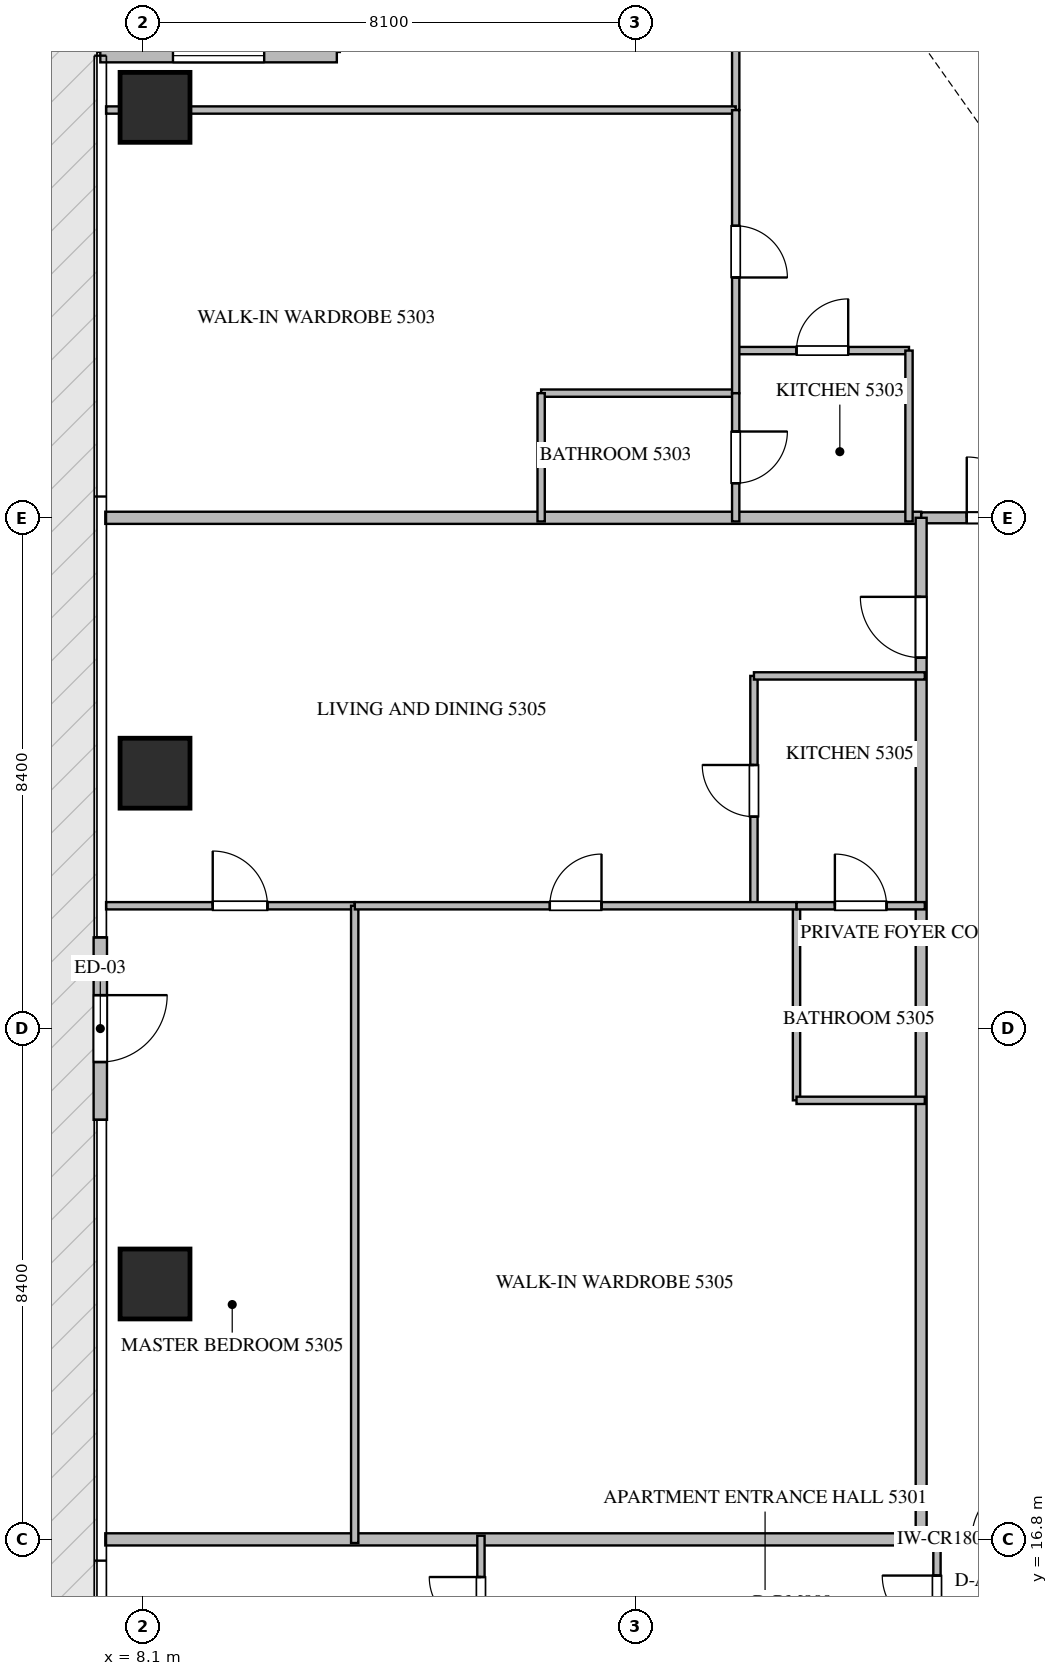
"""IFC4 building model, lengths in metres.
Left out: names, types, materials, properties, quantities, classifications, styles, units other than length and angle.
Written with IfcOpenShell. Run it as: python <this file> out.ifc"""

import sys

from ifc_helpers import new_model, si_unit, direction, frame, frame_2d, origin, origin_2d, place, context, subcontext, project, spatial, rectangle, extrude, source, transform, mapped, element, fill, save


model = new_model("IFC4")
c1 = context("Model", 3, precision=1e-05, world=origin(), true_north=direction((0.0, 1.0)))
c2 = subcontext(c1, "Body", "Model", "MODEL_VIEW")
j1 = project(units=[si_unit("LENGTHUNIT", "METRE"), si_unit("PLANEANGLEUNIT", "RADIAN")], contexts=[c1])
p1 = place(None, origin())
s1 = spatial("IfcSite", under=j1, at=p1, CompositionType="ELEMENT")
p2 = place(p1, origin())
s2 = spatial("IfcBuilding", under=s1, at=p2, CompositionType="ELEMENT")
p3 = place(p2, frame((0.0, 0.0, 214.3)))
s3 = spatial("IfcBuildingStorey", under=s2, at=p3, CompositionType="ELEMENT", Elevation=214.3)
m1 = source(origin(), c2, "Body", "SweptSolid", [
    extrude(rectangle(XDim=1.15, YDim=1.15, at=origin_2d()), origin(), (0.0, 0.0, 1.0), 3.85),
])
for number, where, z_axis, x_axis in (
    (1, (8.3, 21.0, -0.26), (0.0, 0.0, 1.0), (1.0, 0.0, 0.0)),
    (2, (8.3, 29.4, -0.26), (0.0, 0.0, 1.0), (1.0, 0.0, 0.0)),
    (3, (8.3, 40.35, -0.26), (0.0, 0.0, 1.0), (1.0, 0.0, 0.0)),
):
    element("IfcColumn", number, at=place(p3, frame(where, z_axis=z_axis, x_axis=x_axis)), inside=s3, PredefinedType="COLUMN", context=c2, shape_type="MappedRepresentation", body=[
        mapped(m1, transform((0.0, 0.0, 0.0), scale=1.0)),
    ])
p4 = place(p3, frame((11.29, 41.2, 0.0), z_axis=(0.0, 0.0, 1.0), x_axis=(-1.0, 0.0, 0.0)))
e4 = element("IfcWall", 4, at=p4, inside=s3, PredefinedType="ELEMENTEDWALL", context=c2, shape_type="SweptSolid", body=[
    extrude(rectangle(XDim=3.89, YDim=0.22, at=frame_2d((1.945, 0.0))), origin(), (0.0, 0.0, 1.0), 3.575),
])
p5 = place(p4, frame((1.195, 0.0, 0.65)))
e5 = element("IfcOpeningElement", 5, at=p5, cuts=e4, PredefinedType="OPENING", context=c2, shape_type="SweptSolid", body=[
    extrude(rectangle(XDim=1.5, YDim=2.25, at=frame_2d((0.75, 1.125))), frame((0.0, 0.12, 0.0), z_axis=(0.0, -1.0, 0.0), x_axis=(1.0, 0.0, 0.0)), (0.0, 0.0, 1.0), 0.24),
])
p6 = place(p3, frame((7.4, 26.7, 0.0), z_axis=(0.0, 0.0, 1.0), x_axis=(0.0, -1.0, 0.0)))
e6 = element("IfcWall", 6, at=p6, inside=s3, PredefinedType="ELEMENTEDWALL", context=c2, shape_type="SweptSolid", body=[
    extrude(rectangle(XDim=3.0, YDim=0.22, at=frame_2d((1.5, 0.0))), origin(), (0.0, 0.0, 1.0), 3.575),
])
p7 = place(p6, frame((0.95, 0.0, 0.0)))
e7 = element("IfcOpeningElement", 7, at=p7, cuts=e6, PredefinedType="OPENING", context=c2, shape_type="SweptSolid", body=[
    extrude(rectangle(XDim=1.1, YDim=2.2, at=frame_2d((0.55, 1.1))), frame((0.0, 0.12, 0.0), z_axis=(0.0, -1.0, 0.0), x_axis=(1.0, 0.0, 0.0)), (0.0, 0.0, 1.0), 0.24),
])
for number, where, z_axis, x_axis in (
    (8, (7.482, 16.8, 0.0), (0.0, 0.0, 1.0), (1.0, 0.0, 0.0)),
    (9, (7.482, 33.6, 0.0), (0.0, 0.0, 1.0), (1.0, 0.0, 0.0)),
):
    element("IfcWall", number, at=place(p3, frame(where, z_axis=z_axis, x_axis=x_axis)), inside=s3, PredefinedType="PARTITIONING", context=c2, shape_type="SweptSolid", body=[
        extrude(rectangle(XDim=13.418, YDim=0.2, at=frame_2d((6.709, 0.0))), origin(), (0.0, 0.0, 1.0), 3.59),
    ])
p8 = place(p3, frame((20.902, 16.8, 0.0), z_axis=(0.0, 0.0, 1.0), x_axis=(1.0, 0.0, 0.0)))
e10 = element("IfcWall", 10, at=p8, inside=s3, PredefinedType="PARTITIONING", context=c2, shape_type="SweptSolid", body=[
    extrude(rectangle(XDim=2.496, YDim=0.18, at=frame_2d((1.248, 0.0))), origin(), (0.0, 0.0, 1.0), 3.59),
])
p9 = place(p8, frame((0.83, 0.0, 0.0)))
e11 = element("IfcOpeningElement", 11, at=p9, cuts=e10, PredefinedType="OPENING", context=c2, shape_type="SweptSolid", body=[
    extrude(rectangle(XDim=1.0, YDim=2.15, at=frame_2d((0.5, 1.075))), frame((0.0, 0.1, 0.0), z_axis=(0.0, -1.0, 0.0), x_axis=(1.0, 0.0, 0.0)), (0.0, 0.0, 1.0), 0.2),
])
p10 = place(p3, frame((20.902, 33.6, 0.0), z_axis=(0.0, 0.0, 1.0), x_axis=(1.0, 0.0, 0.0)))
e12 = element("IfcWall", 12, at=p10, inside=s3, PredefinedType="PARTITIONING", context=c2, shape_type="SweptSolid", body=[
    extrude(rectangle(XDim=2.496, YDim=0.18, at=frame_2d((1.248, 0.0))), origin(), (0.0, 0.0, 1.0), 3.59),
])
p11 = place(p10, frame((0.748, 0.0, 0.0)))
e13 = element("IfcOpeningElement", 13, at=p11, cuts=e12, PredefinedType="OPENING", context=c2, shape_type="SweptSolid", body=[
    extrude(rectangle(XDim=1.0, YDim=2.15, at=frame_2d((0.5, 1.075))), frame((0.0, 0.1, 0.0), z_axis=(0.0, -1.0, 0.0), x_axis=(1.0, 0.0, 0.0)), (0.0, 0.0, 1.0), 0.2),
])
p12 = place(p3, frame((20.9, 16.8, 0.0), z_axis=(0.0, 0.0, 1.0), x_axis=(0.0, 1.0, 0.0)))
e14 = element("IfcWall", 14, at=p12, inside=s3, PredefinedType="PARTITIONING", context=c2, shape_type="SweptSolid", body=[
    extrude(rectangle(XDim=16.8, YDim=0.18, at=frame_2d((8.4, 0.0))), origin(), (0.0, 0.0, 1.0), 3.59),
])
p13 = place(p12, frame((14.5, 0.0, 0.0)))
e15 = element("IfcOpeningElement", 15, at=p13, cuts=e14, PredefinedType="OPENING", context=c2, shape_type="SweptSolid", body=[
    extrude(rectangle(XDim=1.0, YDim=2.15, at=frame_2d((0.5, 1.075))), frame((0.0, 0.1, 0.0), z_axis=(0.0, -1.0, 0.0), x_axis=(1.0, 0.0, 0.0)), (0.0, 0.0, 1.0), 0.2),
])
p14 = place(p3, frame((21.16, 14.65, 0.0), z_axis=(0.0, 0.0, 1.0), x_axis=(0.0, 1.0, 0.0)))
e16 = element("IfcWall", 16, at=p14, inside=s3, PredefinedType="PARTITIONING", context=c2, shape_type="SweptSolid", body=[
    extrude(rectangle(XDim=2.21, YDim=0.12, at=frame_2d((1.105, 0.0))), origin(), (0.0, 0.0, 1.0), 3.59),
])
p15 = place(p14, frame((0.655, 0.0, 0.0)))
e17 = element("IfcOpeningElement", 17, at=p15, cuts=e16, PredefinedType="OPENING", context=c2, shape_type="SweptSolid", body=[
    extrude(rectangle(XDim=0.9, YDim=2.1, at=frame_2d((0.45, 1.05))), frame((0.0, 0.07, 0.0), z_axis=(0.0, -1.0, 0.0), x_axis=(1.0, 0.0, 0.0)), (0.0, 0.0, 1.0), 0.14),
])
p16 = place(p3, frame((13.66, 14.652, 0.0), z_axis=(0.0, 0.0, 1.0), x_axis=(0.0, 1.0, 0.0)))
e18 = element("IfcWall", 18, at=p16, inside=s3, PredefinedType="PARTITIONING", context=c2, shape_type="SweptSolid", body=[
    extrude(rectangle(XDim=2.208, YDim=0.12, at=frame_2d((1.104, 0.0))), origin(), (0.0, 0.0, 1.0), 3.59),
])
p17 = place(p16, frame((0.679, 0.0, 0.0)))
e19 = element("IfcOpeningElement", 19, at=p17, cuts=e18, PredefinedType="OPENING", context=c2, shape_type="SweptSolid", body=[
    extrude(rectangle(XDim=0.85, YDim=2.1, at=frame_2d((0.425, 1.05))), frame((0.0, 0.07, 0.0), z_axis=(0.0, -1.0, 0.0), x_axis=(1.0, 0.0, 0.0)), (0.0, 0.0, 1.0), 0.14),
])
p18 = place(p3, frame((17.85, 36.35, 0.0), z_axis=(0.0, 0.0, 1.0), x_axis=(1.0, 0.0, 0.0)))
e20 = element("IfcWall", 20, at=p18, inside=s3, PredefinedType="PARTITIONING", context=c2, shape_type="SweptSolid", body=[
    extrude(rectangle(XDim=2.85, YDim=0.12, at=frame_2d((1.425, 0.0))), origin(), (0.0, 0.0, 1.0), 3.59),
])
p19 = place(p18, frame((1.0, 0.0, 0.0)))
e21 = element("IfcOpeningElement", 21, at=p19, cuts=e20, PredefinedType="OPENING", context=c2, shape_type="SweptSolid", body=[
    extrude(rectangle(XDim=0.85, YDim=2.1, at=frame_2d((0.425, 1.05))), frame((0.0, 0.07, 0.0), z_axis=(0.0, -1.0, 0.0), x_axis=(1.0, 0.0, 0.0)), (0.0, 0.0, 1.0), 0.14),
])
p20 = place(p3, frame((20.7, 36.35, 0.0), z_axis=(0.0, 0.0, 1.0), x_axis=(0.0, -1.0, 0.0)))
e22 = element("IfcWall", 22, at=p20, inside=s3, PredefinedType="PARTITIONING", context=c2, shape_type="SweptSolid", body=[
    extrude(rectangle(XDim=2.81, YDim=0.12, at=frame_2d((1.405, 0.0))), origin(), (0.0, 0.0, 1.0), 3.59),
])
p21 = place(p3, frame((17.85, 49.105, 0.0), z_axis=(0.0, 0.0, 1.0), x_axis=(0.0, -1.0, 0.0)))
e23 = element("IfcWall", 23, at=p21, inside=s3, PredefinedType="PARTITIONING", context=c2, shape_type="SweptSolid", body=[
    extrude(rectangle(XDim=8.799, YDim=0.12, at=frame_2d((4.399, 0.0))), origin(), (0.0, 0.0, 1.0), 3.59),
])
p22 = place(p21, frame((4.344, 0.0, 0.0)))
e24 = element("IfcOpeningElement", 24, at=p22, cuts=e23, PredefinedType="OPENING", context=c2, shape_type="SweptSolid", body=[
    extrude(rectangle(XDim=0.9, YDim=2.1, at=frame_2d((0.45, 1.05))), frame((0.0, 0.07, 0.0), z_axis=(0.0, -1.0, 0.0), x_axis=(1.0, 0.0, 0.0)), (0.0, 0.0, 1.0), 0.14),
])
p23 = place(p3, frame((7.495, 40.306, 0.0), z_axis=(0.0, 0.0, 1.0), x_axis=(1.0, 0.0, 0.0)))
e25 = element("IfcWall", 25, at=p23, inside=s3, PredefinedType="PARTITIONING", context=c2, shape_type="SweptSolid", body=[
    extrude(rectangle(XDim=10.355, YDim=0.12, at=frame_2d((5.177, 0.0))), origin(), (0.0, 0.0, 1.0), 3.122),
])
p24 = place(p3, frame((14.65, 35.65, 0.0), z_axis=(0.0, 0.0, 1.0), x_axis=(1.0, 0.0, 0.0)))
e26 = element("IfcWall", 26, at=p24, inside=s3, PredefinedType="PARTITIONING", context=c2, shape_type="SweptSolid", body=[
    extrude(rectangle(XDim=3.2, YDim=0.12, at=frame_2d((1.6, 0.0))), origin(), (0.0, 0.0, 1.0), 3.59),
])
p25 = place(p3, frame((14.65, 35.65, 0.0), z_axis=(0.0, 0.0, 1.0), x_axis=(0.0, -1.0, 0.0)))
e27 = element("IfcWall", 27, at=p25, inside=s3, PredefinedType="PARTITIONING", context=c2, shape_type="SweptSolid", body=[
    extrude(rectangle(XDim=2.11, YDim=0.12, at=frame_2d((1.055, 0.0))), origin(), (0.0, 0.0, 1.0), 3.59),
])
p26 = place(p3, frame((17.85, 40.304, 0.0), z_axis=(0.0, 0.0, 1.0), x_axis=(0.0, -1.0, 0.0)))
e28 = element("IfcWall", 28, at=p26, inside=s3, PredefinedType="PARTITIONING", context=c2, shape_type="SweptSolid", body=[
    extrude(rectangle(XDim=4.654, YDim=0.12, at=frame_2d((2.327, 0.0))), origin(), (0.0, 0.0, 1.0), 3.59),
])
p27 = place(p26, frame((1.902, 0.0, 0.0)))
e29 = element("IfcOpeningElement", 29, at=p27, cuts=e28, PredefinedType="OPENING", context=c2, shape_type="SweptSolid", body=[
    extrude(rectangle(XDim=0.85, YDim=2.1, at=frame_2d((0.425, 1.05))), frame((0.0, 0.07, 0.0), z_axis=(0.0, -1.0, 0.0), x_axis=(1.0, 0.0, 0.0)), (0.0, 0.0, 1.0), 0.14),
])
p28 = place(p3, frame((17.85, 35.648, 0.0), z_axis=(0.0, 0.0, 1.0), x_axis=(0.0, -1.0, 0.0)))
e30 = element("IfcWall", 30, at=p28, inside=s3, PredefinedType="PARTITIONING", context=c2, shape_type="SweptSolid", body=[
    extrude(rectangle(XDim=2.108, YDim=0.12, at=frame_2d((1.054, 0.0))), origin(), (0.0, 0.0, 1.0), 3.59),
])
p29 = place(p28, frame((0.629, 0.0, 0.0)))
e31 = element("IfcOpeningElement", 31, at=p29, cuts=e30, PredefinedType="OPENING", context=c2, shape_type="SweptSolid", body=[
    extrude(rectangle(XDim=0.85, YDim=2.1, at=frame_2d((0.425, 1.05))), frame((0.0, 0.07, 0.0), z_axis=(0.0, -1.0, 0.0), x_axis=(1.0, 0.0, 0.0)), (0.0, 0.0, 1.0), 0.14),
])
p30 = place(p3, frame((18.15, 27.22, 0.0), z_axis=(0.0, 0.0, 1.0), x_axis=(0.0, 1.0, 0.0)))
e32 = element("IfcWall", 32, at=p30, inside=s3, PredefinedType="PARTITIONING", context=c2, shape_type="SweptSolid", body=[
    extrude(rectangle(XDim=3.78, YDim=0.12, at=frame_2d((1.89, 0.0))), origin(), (0.0, 0.0, 1.0), 3.59),
])
p31 = place(p30, frame((1.465, 0.0, 0.0)))
e33 = element("IfcOpeningElement", 33, at=p31, cuts=e32, PredefinedType="OPENING", context=c2, shape_type="SweptSolid", body=[
    extrude(rectangle(XDim=0.85, YDim=2.1, at=frame_2d((0.425, 1.05))), frame((0.0, 0.07, 0.0), z_axis=(0.0, -1.0, 0.0), x_axis=(1.0, 0.0, 0.0)), (0.0, 0.0, 1.0), 0.14),
])
p32 = place(p3, frame((18.15, 31.0, 0.0), z_axis=(0.0, 0.0, 1.0), x_axis=(1.0, 0.0, 0.0)))
e34 = element("IfcWall", 34, at=p32, inside=s3, PredefinedType="PARTITIONING", context=c2, shape_type="SweptSolid", body=[
    extrude(rectangle(XDim=2.81, YDim=0.12, at=frame_2d((1.405, 0.0))), origin(), (0.0, 0.0, 1.0), 3.59),
])
p33 = place(p3, frame((7.495, 27.22, 0.0), z_axis=(0.0, 0.0, 1.0), x_axis=(1.0, 0.0, 0.0)))
e35 = element("IfcWall", 35, at=p33, inside=s3, PredefinedType="PARTITIONING", context=c2, shape_type="SweptSolid", body=[
    extrude(rectangle(XDim=4.089, YDim=0.12, at=frame_2d((2.044, 0.0))), origin(), (0.0, 0.0, 1.0), 3.59),
])
p34 = place(p33, frame((1.754, 0.0, 0.0)))
e36 = element("IfcOpeningElement", 36, at=p34, cuts=e35, PredefinedType="OPENING", context=c2, shape_type="SweptSolid", body=[
    extrude(rectangle(XDim=0.9, YDim=2.1, at=frame_2d((0.45, 1.05))), frame((0.0, 0.07, 0.0), z_axis=(0.0, -1.0, 0.0), x_axis=(1.0, 0.0, 0.0)), (0.0, 0.0, 1.0), 0.14),
])
p35 = place(p3, frame((11.584, 16.74, 0.0), z_axis=(0.0, 0.0, 1.0), x_axis=(0.0, 1.0, 0.0)))
e37 = element("IfcWall", 37, at=p35, inside=s3, PredefinedType="PARTITIONING", context=c2, shape_type="SweptSolid", body=[
    extrude(rectangle(XDim=10.48, YDim=0.12, at=frame_2d((5.24, 0.0))), origin(), (0.0, 0.0, 1.0), 3.59),
])
p36 = place(p3, frame((18.85, 24.02, 0.0), z_axis=(0.0, 0.0, 1.0), x_axis=(0.0, 1.0, 0.0)))
e38 = element("IfcWall", 38, at=p36, inside=s3, PredefinedType="PARTITIONING", context=c2, shape_type="SweptSolid", body=[
    extrude(rectangle(XDim=3.2, YDim=0.12, at=frame_2d((1.6, 0.0))), origin(), (0.0, 0.0, 1.0), 3.59),
])
p37 = place(p3, frame((18.85, 24.02, 0.0), z_axis=(0.0, 0.0, 1.0), x_axis=(1.0, 0.0, 0.0)))
e39 = element("IfcWall", 39, at=p37, inside=s3, PredefinedType="PARTITIONING", context=c2, shape_type="SweptSolid", body=[
    extrude(rectangle(XDim=2.11, YDim=0.12, at=frame_2d((1.055, 0.0))), origin(), (0.0, 0.0, 1.0), 3.59),
])
p38 = place(p3, frame((11.586, 27.22, 0.0), z_axis=(0.0, 0.0, 1.0), x_axis=(1.0, 0.0, 0.0)))
e40 = element("IfcWall", 40, at=p38, inside=s3, PredefinedType="PARTITIONING", context=c2, shape_type="SweptSolid", body=[
    extrude(rectangle(XDim=7.264, YDim=0.12, at=frame_2d((3.632, 0.0))), origin(), (0.0, 0.0, 1.0), 3.59),
])
p39 = place(p38, frame((3.207, 0.0, 0.0)))
e41 = element("IfcOpeningElement", 41, at=p39, cuts=e40, PredefinedType="OPENING", context=c2, shape_type="SweptSolid", body=[
    extrude(rectangle(XDim=0.85, YDim=2.1, at=frame_2d((0.425, 1.05))), frame((0.0, 0.07, 0.0), z_axis=(0.0, -1.0, 0.0), x_axis=(1.0, 0.0, 0.0)), (0.0, 0.0, 1.0), 0.14),
])
p40 = place(p3, frame((18.852, 27.22, 0.0), z_axis=(0.0, 0.0, 1.0), x_axis=(1.0, 0.0, 0.0)))
e42 = element("IfcWall", 42, at=p40, inside=s3, PredefinedType="PARTITIONING", context=c2, shape_type="SweptSolid", body=[
    extrude(rectangle(XDim=2.108, YDim=0.12, at=frame_2d((1.054, 0.0))), origin(), (0.0, 0.0, 1.0), 3.59),
])
p41 = place(p40, frame((0.629, 0.0, 0.0)))
e43 = element("IfcOpeningElement", 43, at=p41, cuts=e42, PredefinedType="OPENING", context=c2, shape_type="SweptSolid", body=[
    extrude(rectangle(XDim=0.85, YDim=2.1, at=frame_2d((0.425, 1.05))), frame((0.0, 0.07, 0.0), z_axis=(0.0, -1.0, 0.0), x_axis=(1.0, 0.0, 0.0)), (0.0, 0.0, 1.0), 0.14),
])
m2 = source(origin(), c2, "Body", "SweptSolid", [
    extrude(rectangle(XDim=1.5, YDim=2.25, at=frame_2d((0.75, 1.125))), frame((0.0, 0.03, 0.0), z_axis=(0.0, -1.0, 0.0), x_axis=(1.0, 0.0, 0.0)), (0.0, 0.0, 1.0), 0.06),
])
p42 = place(p5, origin())
e44 = element("IfcWindow", 44, at=p42, inside=s3, PartitioningType="SINGLE_PANEL", PredefinedType="WINDOW", context=c2, shape_type="MappedRepresentation", body=[
    mapped(m2, transform((0.0, 0.0, 0.0), scale=1.0)),
])
fill(e5, e44)
m3 = source(origin(), c2, "Body", "SweptSolid", [
    extrude(rectangle(XDim=1.1, YDim=2.2, at=frame_2d((0.55, 1.1))), frame((0.0, 0.025, 0.0), z_axis=(0.0, -1.0, 0.0), x_axis=(1.0, 0.0, 0.0)), (0.0, 0.0, 1.0), 0.05),
])
p43 = place(p7, origin())
e45 = element("IfcDoor", 45, at=p43, inside=s3, OperationType="SINGLE_SWING_LEFT", PredefinedType="DOOR", context=c2, shape_type="MappedRepresentation", body=[
    mapped(m3, transform((0.0, 0.0, 0.0), scale=1.0)),
])
fill(e7, e45)
m4 = source(origin(), c2, "Body", "SweptSolid", [
    extrude(rectangle(XDim=1.0, YDim=2.15, at=frame_2d((0.5, 1.075))), frame((0.0, 0.025, 0.0), z_axis=(0.0, -1.0, 0.0), x_axis=(1.0, 0.0, 0.0)), (0.0, 0.0, 1.0), 0.05),
])
p44 = place(p9, origin())
e46 = element("IfcDoor", 46, at=p44, inside=s3, OperationType="SINGLE_SWING_RIGHT", PredefinedType="DOOR", context=c2, shape_type="MappedRepresentation", body=[
    mapped(m4, transform((0.0, 0.0, 0.0), scale=1.0)),
])
fill(e11, e46)
p45 = place(p11, origin())
e47 = element("IfcDoor", 47, at=p45, inside=s3, OperationType="SINGLE_SWING_LEFT", PredefinedType="DOOR", context=c2, shape_type="MappedRepresentation", body=[
    mapped(m4, transform((0.0, 0.0, 0.0), scale=1.0)),
])
fill(e13, e47)
p46 = place(p13, origin())
e48 = element("IfcDoor", 48, at=p46, inside=s3, OperationType="SINGLE_SWING_RIGHT", PredefinedType="DOOR", context=c2, shape_type="MappedRepresentation", body=[
    mapped(m4, transform((0.0, 0.0, 0.0), scale=1.0)),
])
fill(e15, e48)
m5 = source(origin(), c2, "Body", "SweptSolid", [
    extrude(rectangle(XDim=0.9, YDim=2.1, at=frame_2d((0.45, 1.05))), frame((0.0, 0.025, 0.0), z_axis=(0.0, -1.0, 0.0), x_axis=(1.0, 0.0, 0.0)), (0.0, 0.0, 1.0), 0.05),
])
p47 = place(p15, origin())
e49 = element("IfcDoor", 49, at=p47, inside=s3, OperationType="SINGLE_SWING_RIGHT", PredefinedType="DOOR", context=c2, shape_type="MappedRepresentation", body=[
    mapped(m5, transform((0.0, 0.0, 0.0), scale=1.0)),
])
fill(e17, e49)
m6 = source(origin(), c2, "Body", "SweptSolid", [
    extrude(rectangle(XDim=0.85, YDim=2.1, at=frame_2d((0.425, 1.05))), frame((0.0, 0.025, 0.0), z_axis=(0.0, -1.0, 0.0), x_axis=(1.0, 0.0, 0.0)), (0.0, 0.0, 1.0), 0.05),
])
p48 = place(p17, origin())
e50 = element("IfcDoor", 50, at=p48, inside=s3, OperationType="SINGLE_SWING_RIGHT", PredefinedType="DOOR", context=c2, shape_type="MappedRepresentation", body=[
    mapped(m6, transform((0.0, 0.0, 0.0), scale=1.0)),
])
fill(e19, e50)
p49 = place(p19, origin())
e51 = element("IfcDoor", 51, at=p49, inside=s3, OperationType="SINGLE_SWING_RIGHT", PredefinedType="DOOR", context=c2, shape_type="MappedRepresentation", body=[
    mapped(m6, transform((0.0, 0.0, 0.0), scale=1.0)),
])
fill(e21, e51)
p50 = place(p27, origin())
e52 = element("IfcDoor", 52, at=p50, inside=s3, OperationType="SINGLE_SWING_RIGHT", PredefinedType="DOOR", context=c2, shape_type="MappedRepresentation", body=[
    mapped(m6, transform((0.0, 0.0, 0.0), scale=1.0)),
])
fill(e29, e52)
p51 = place(p29, origin())
e53 = element("IfcDoor", 53, at=p51, inside=s3, OperationType="SINGLE_SWING_LEFT", PredefinedType="DOOR", context=c2, shape_type="MappedRepresentation", body=[
    mapped(m6, transform((0.0, 0.0, 0.0), scale=1.0)),
])
fill(e31, e53)
p52 = place(p31, origin())
e54 = element("IfcDoor", 54, at=p52, inside=s3, OperationType="SINGLE_SWING_RIGHT", PredefinedType="DOOR", context=c2, shape_type="MappedRepresentation", body=[
    mapped(m6, transform((0.0, 0.0, 0.0), scale=1.0)),
])
fill(e33, e54)
p53 = place(p34, origin())
e55 = element("IfcDoor", 55, at=p53, inside=s3, OperationType="SINGLE_SWING_LEFT", PredefinedType="DOOR", context=c2, shape_type="MappedRepresentation", body=[
    mapped(m5, transform((0.0, 0.0, 0.0), scale=1.0)),
])
fill(e36, e55)
p54 = place(p39, origin())
e56 = element("IfcDoor", 56, at=p54, inside=s3, OperationType="SINGLE_SWING_RIGHT", PredefinedType="DOOR", context=c2, shape_type="MappedRepresentation", body=[
    mapped(m6, transform((0.0, 0.0, 0.0), scale=1.0)),
])
fill(e41, e56)
p55 = place(p41, origin())
e57 = element("IfcDoor", 57, at=p55, inside=s3, OperationType="SINGLE_SWING_LEFT", PredefinedType="DOOR", context=c2, shape_type="MappedRepresentation", body=[
    mapped(m6, transform((0.0, 0.0, 0.0), scale=1.0)),
])
fill(e43, e57)
save(model, sys.argv[1])
